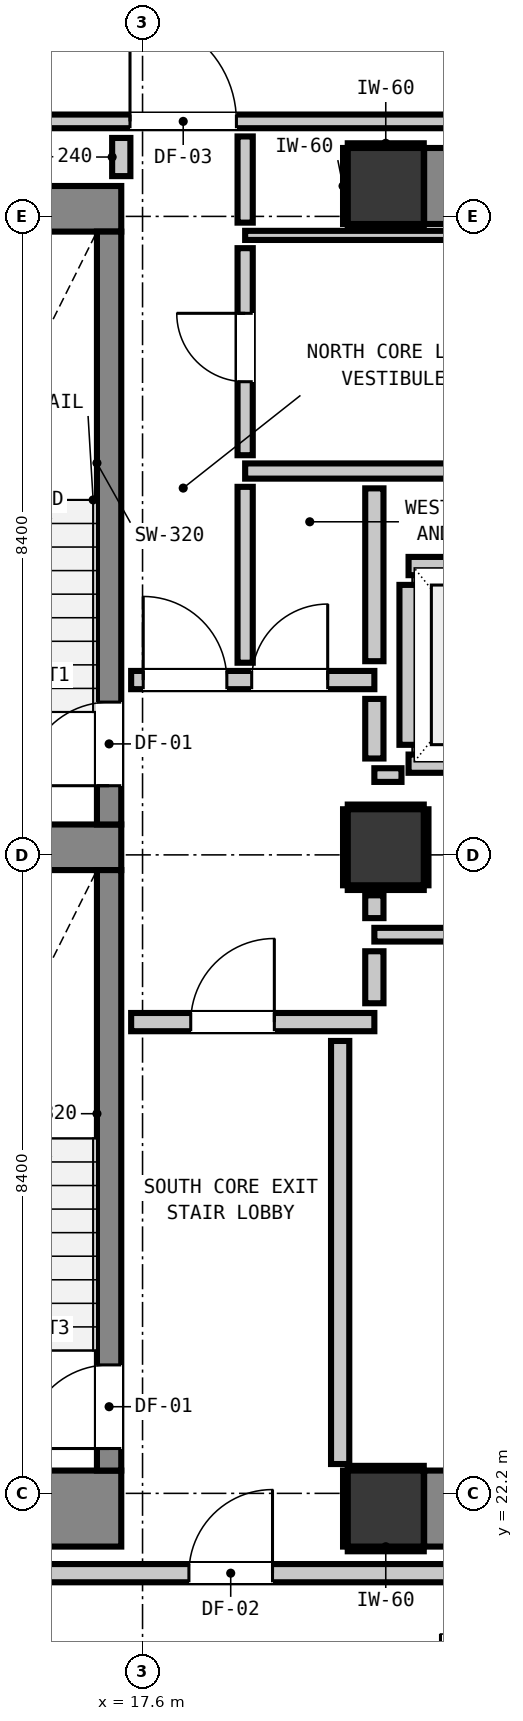
"""IFC4 building model, lengths in metres.
Left out: names, types, materials, properties, quantities, classifications, styles, units other than length and angle.
Written with IfcOpenShell. Run it as: python <this file> out.ifc"""

import sys

from ifc_helpers import new_model, si_unit, direction, frame, frame_2d, origin, origin_2d, place, context, subcontext, project, spatial, rectangle, extrude, element, fill, save


model = new_model("IFC4")
c1 = context("Model", 3, precision=1e-05, world=origin(), true_north=direction((0.0, 1.0)))
c2 = subcontext(c1, "Body", "Model", "MODEL_VIEW")
j1 = project(units=[si_unit("LENGTHUNIT", "METRE"), si_unit("PLANEANGLEUNIT", "RADIAN")], contexts=[c1])
p1 = place(None, origin())
s1 = spatial("IfcSite", under=j1, at=p1, CompositionType="ELEMENT")
p2 = place(p1, origin())
s2 = spatial("IfcBuilding", under=s1, at=p2, CompositionType="ELEMENT")
p3 = place(p2, frame((0.0, 0.0, 162.52)))
s3 = spatial("IfcBuildingStorey", under=s2, at=p3, CompositionType="ELEMENT", Elevation=162.52)
for number, where, z_axis, x_axis in (
    (1, (20.8, 22.0, 0.0), (0.0, 0.0, 1.0), (1.0, 0.0, 0.0)),
    (2, (20.8, 39.4, 0.0), (0.0, 0.0, 1.0), (1.0, 0.0, 0.0)),
):
    element("IfcColumn", number, at=place(p3, frame(where, z_axis=z_axis, x_axis=x_axis)), inside=s3, PredefinedType="COLUMN", context=c2, shape_type="SweptSolid", body=[
        extrude(rectangle(XDim=1.0, YDim=1.0, at=origin_2d()), origin(), (0.0, 0.0, 1.0), 3.32),
    ])
p4 = place(p3, frame((13.24, 22.0, 0.0), z_axis=(0.0, 0.0, 1.0), x_axis=(1.0, 0.0, 0.0)))
e3 = element("IfcWall", 3, at=p4, inside=s3, PredefinedType="SHEAR", context=c2, shape_type="SweptSolid", body=[
    extrude(rectangle(XDim=4.08, YDim=1.0, at=frame_2d((2.04, 0.0))), origin(), (0.0, 0.0, 1.0), 3.32),
])
p5 = place(p3, frame((13.24, 39.1, 0.0), z_axis=(0.0, 0.0, 1.0), x_axis=(1.0, 0.0, 0.0)))
e4 = element("IfcWall", 4, at=p5, inside=s3, PredefinedType="SHEAR", context=c2, shape_type="SweptSolid", body=[
    extrude(rectangle(XDim=4.08, YDim=0.6, at=frame_2d((2.04, 0.0))), origin(), (0.0, 0.0, 1.0), 3.32),
])
p6 = place(p3, frame((13.905, 30.7, 0.0), z_axis=(0.0, 0.0, 1.0), x_axis=(1.0, 0.0, 0.0)))
e5 = element("IfcWall", 5, at=p6, inside=s3, PredefinedType="SHEAR", context=c2, shape_type="SweptSolid", body=[
    extrude(rectangle(XDim=3.415, YDim=0.6, at=frame_2d((1.708, 0.0))), origin(), (0.0, 0.0, 1.0), 3.32),
])
for number, where, z_axis, x_axis in (
    (6, (21.305, 22.0, 0.0), (0.0, 0.0, 1.0), (1.0, 0.0, 0.0)),
    (7, (21.305, 39.4, 0.0), (0.0, 0.0, 1.0), (1.0, 0.0, 0.0)),
):
    element("IfcWall", number, at=place(p3, frame(where, z_axis=z_axis, x_axis=x_axis)), inside=s3, PredefinedType="SHEAR", context=c2, shape_type="SweptSolid", body=[
        extrude(rectangle(XDim=7.39, YDim=1.0, at=frame_2d((3.695, 0.0))), origin(), (0.0, 0.0, 1.0), 3.32),
    ])
p7 = place(p3, frame((17.16, 31.0, 0.0), z_axis=(0.0, 0.0, 1.0), x_axis=(0.0, 1.0, 0.0)))
e8 = element("IfcWall", 8, at=p7, inside=s3, PredefinedType="SHEAR", context=c2, shape_type="SweptSolid", body=[
    extrude(rectangle(XDim=7.8, YDim=0.32, at=frame_2d((3.9, 0.0))), origin(), (0.0, 0.0, 1.0), 3.32),
])
p8 = place(p7, frame((0.51, 0.0, 0.0)))
e9 = element("IfcOpeningElement", 9, at=p8, cuts=e8, PredefinedType="OPENING", context=c2, shape_type="SweptSolid", body=[
    extrude(rectangle(XDim=1.1, YDim=2.15, at=frame_2d((0.55, 1.075))), frame((0.0, 0.17, 0.0), z_axis=(0.0, -1.0, 0.0), x_axis=(1.0, 0.0, 0.0)), (0.0, 0.0, 1.0), 0.34),
])
p9 = place(p3, frame((17.16, 22.5, 0.0), z_axis=(0.0, 0.0, 1.0), x_axis=(0.0, 1.0, 0.0)))
e10 = element("IfcWall", 10, at=p9, inside=s3, PredefinedType="SHEAR", context=c2, shape_type="SweptSolid", body=[
    extrude(rectangle(XDim=7.9, YDim=0.32, at=frame_2d((3.95, 0.0))), origin(), (0.0, 0.0, 1.0), 3.32),
])
p10 = place(p9, frame((0.29, 0.0, 0.0)))
e11 = element("IfcOpeningElement", 11, at=p10, cuts=e10, PredefinedType="OPENING", context=c2, shape_type="SweptSolid", body=[
    extrude(rectangle(XDim=1.1, YDim=2.15, at=frame_2d((0.55, 1.075))), frame((0.0, 0.17, 0.0), z_axis=(0.0, -1.0, 0.0), x_axis=(1.0, 0.0, 0.0)), (0.0, 0.0, 1.0), 0.34),
])
p11 = place(p3, frame((20.8, 30.7, 0.0), z_axis=(0.0, 0.0, 1.0), x_axis=(1.0, 0.0, 0.0)))
e12 = element("IfcColumn", 12, at=p11, inside=s3, PredefinedType="COLUMN", context=c2, shape_type="SweptSolid", body=[
    extrude(rectangle(XDim=1.0, YDim=1.0, at=origin_2d()), origin(), (0.0, 0.0, 1.0), 3.32),
])
for number, where, z_axis, x_axis in (
    (13, (21.1, 31.8, 0.0), (0.0, 0.0, 1.0), (1.0, 0.0, 0.0)),
    (14, (21.1, 34.4, 0.0), (0.0, 0.0, 1.0), (1.0, 0.0, 0.0)),
):
    element("IfcWall", number, at=place(p3, frame(where, z_axis=z_axis, x_axis=x_axis)), inside=s3, PredefinedType="PARTITIONING", context=c2, shape_type="SweptSolid", body=[
        extrude(rectangle(XDim=2.2, YDim=0.24, at=frame_2d((1.1, 0.0))), origin(), (0.0, 0.0, 1.0), 2.9),
    ])
p12 = place(p3, frame((21.1, 32.048, 0.0), z_axis=(0.0, 0.0, 1.0), x_axis=(0.0, 1.0, 0.0)))
e15 = element("IfcWall", 15, at=p12, inside=s3, PredefinedType="PARTITIONING", context=c2, shape_type="SweptSolid", body=[
    extrude(rectangle(XDim=2.104, YDim=0.24, at=frame_2d((1.052, 0.0))), origin(), (0.0, 0.0, 1.0), 0.905),
])
p13 = place(p3, frame((9.407, 21.15, 0.0), z_axis=(0.0, 0.0, 1.0), x_axis=(1.0, 0.0, 0.0)))
e16 = element("IfcWall", 16, at=p13, inside=s3, PredefinedType="PARTITIONING", context=c2, shape_type="SweptSolid", body=[
    extrude(rectangle(XDim=39.386, YDim=0.24, at=frame_2d((19.693, 0.0))), origin(), (0.0, 0.0, 1.0), 2.9),
])
p14 = place(p13, frame((8.803, 0.0, 0.0)))
e17 = element("IfcOpeningElement", 17, at=p14, cuts=e16, PredefinedType="OPENING", context=c2, shape_type="SweptSolid", body=[
    extrude(rectangle(XDim=1.1, YDim=2.15, at=frame_2d((0.55, 1.075))), frame((0.0, 0.13, 0.0), z_axis=(0.0, -1.0, 0.0), x_axis=(1.0, 0.0, 0.0)), (0.0, 0.0, 1.0), 0.26),
])
p15 = place(p13, frame((1.192, 0.0, 0.0)))
e18 = element("IfcOpeningElement", 18, at=p15, cuts=e16, PredefinedType="OPENING", context=c2, shape_type="SweptSolid", body=[
    extrude(rectangle(XDim=1.4, YDim=2.15, at=frame_2d((0.7, 1.075))), frame((0.0, 0.13, 0.0), z_axis=(0.0, -1.0, 0.0), x_axis=(1.0, 0.0, 0.0)), (0.0, 0.0, 1.0), 0.26),
])
p16 = place(p13, frame((28.643, 0.0, 0.0)))
e19 = element("IfcOpeningElement", 19, at=p16, cuts=e16, PredefinedType="OPENING", context=c2, shape_type="SweptSolid", body=[
    extrude(rectangle(XDim=1.4, YDim=2.15, at=frame_2d((0.7, 1.075))), frame((0.0, 0.13, 0.0), z_axis=(0.0, -1.0, 0.0), x_axis=(1.0, 0.0, 0.0)), (0.0, 0.0, 1.0), 0.26),
])
p17 = place(p13, frame((34.394, 0.0, 0.0)))
e20 = element("IfcOpeningElement", 20, at=p17, cuts=e16, PredefinedType="OPENING", context=c2, shape_type="SweptSolid", body=[
    extrude(rectangle(XDim=0.9, YDim=2.1, at=frame_2d((0.45, 1.05))), frame((0.0, 0.13, 0.0), z_axis=(0.0, -1.0, 0.0), x_axis=(1.0, 0.0, 0.0)), (0.0, 0.0, 1.0), 0.26),
])
p18 = place(p3, frame((17.45, 28.4, 0.0), z_axis=(0.0, 0.0, 1.0), x_axis=(1.0, 0.0, 0.0)))
e21 = element("IfcWall", 21, at=p18, inside=s3, PredefinedType="PARTITIONING", context=c2, shape_type="SweptSolid", body=[
    extrude(rectangle(XDim=3.2, YDim=0.24, at=frame_2d((1.6, 0.0))), origin(), (0.0, 0.0, 1.0), 2.9),
])
p19 = place(p18, frame((0.784, 0.0, 0.0)))
e22 = element("IfcOpeningElement", 22, at=p19, cuts=e21, PredefinedType="OPENING", context=c2, shape_type="SweptSolid", body=[
    extrude(rectangle(XDim=1.1, YDim=2.15, at=frame_2d((0.55, 1.075))), frame((0.0, 0.13, 0.0), z_axis=(0.0, -1.0, 0.0), x_axis=(1.0, 0.0, 0.0)), (0.0, 0.0, 1.0), 0.26),
])
p20 = place(p3, frame((17.45, 32.9, 0.0), z_axis=(0.0, 0.0, 1.0), x_axis=(1.0, 0.0, 0.0)))
e23 = element("IfcWall", 23, at=p20, inside=s3, PredefinedType="PARTITIONING", context=c2, shape_type="SweptSolid", body=[
    extrude(rectangle(XDim=3.2, YDim=0.24, at=frame_2d((1.6, 0.0))), origin(), (0.0, 0.0, 1.0), 2.9),
])
p21 = place(p20, frame((0.159, 0.0, 0.0)))
e24 = element("IfcOpeningElement", 24, at=p21, cuts=e23, PredefinedType="OPENING", context=c2, shape_type="SweptSolid", body=[
    extrude(rectangle(XDim=1.1, YDim=2.15, at=frame_2d((0.55, 1.075))), frame((0.0, 0.13, 0.0), z_axis=(0.0, -1.0, 0.0), x_axis=(1.0, 0.0, 0.0)), (0.0, 0.0, 1.0), 0.26),
])
p22 = place(p20, frame((1.586, 0.0, 0.0)))
e25 = element("IfcOpeningElement", 25, at=p22, cuts=e23, PredefinedType="OPENING", context=c2, shape_type="SweptSolid", body=[
    extrude(rectangle(XDim=1.0, YDim=2.15, at=frame_2d((0.5, 1.075))), frame((0.0, 0.13, 0.0), z_axis=(0.0, -1.0, 0.0), x_axis=(1.0, 0.0, 0.0)), (0.0, 0.0, 1.0), 0.26),
])
p23 = place(p3, frame((18.95, 35.65, 0.0), z_axis=(0.0, 0.0, 1.0), x_axis=(1.0, 0.0, 0.0)))
e26 = element("IfcWall", 26, at=p23, inside=s3, PredefinedType="PARTITIONING", context=c2, shape_type="SweptSolid", body=[
    extrude(rectangle(XDim=11.025, YDim=0.2, at=frame_2d((5.513, 0.0))), origin(), (0.0, 0.0, 1.0), 2.9),
])
p24 = place(p3, frame((20.65, 29.55, 0.0), z_axis=(0.0, 0.0, 1.0), x_axis=(1.0, 0.0, 0.0)))
e27 = element("IfcWall", 27, at=p24, inside=s3, PredefinedType="PARTITIONING", context=c2, shape_type="SweptSolid", body=[
    extrude(rectangle(XDim=9.325, YDim=0.18, at=frame_2d((4.663, 0.0))), origin(), (0.0, 0.0, 1.0), 2.9),
])
p25 = place(p3, frame((20.65, 31.65, 0.0), z_axis=(0.0, 0.0, 1.0), x_axis=(1.0, 0.0, 0.0)))
e28 = element("IfcWall", 28, at=p25, inside=s3, PredefinedType="PARTITIONING", context=c2, shape_type="SweptSolid", body=[
    extrude(rectangle(XDim=0.357, YDim=0.18, at=frame_2d((0.179, 0.0))), origin(), (0.0, 0.0, 1.0), 2.9),
])
p26 = place(p3, frame((9.407, 40.25, 0.0), z_axis=(0.0, 0.0, 1.0), x_axis=(1.0, 0.0, 0.0)))
e29 = element("IfcWall", 29, at=p26, inside=s3, PredefinedType="PARTITIONING", context=c2, shape_type="SweptSolid", body=[
    extrude(rectangle(XDim=39.386, YDim=0.18, at=frame_2d((19.693, 0.0))), origin(), (0.0, 0.0, 1.0), 2.9),
])
p27 = place(p26, frame((8.028, 0.0, 0.0)))
e30 = element("IfcOpeningElement", 30, at=p27, cuts=e29, PredefinedType="OPENING", context=c2, shape_type="SweptSolid", body=[
    extrude(rectangle(XDim=1.4, YDim=2.15, at=frame_2d((0.7, 1.075))), frame((0.0, 0.1, 0.0), z_axis=(0.0, -1.0, 0.0), x_axis=(1.0, 0.0, 0.0)), (0.0, 0.0, 1.0), 0.2),
])
p28 = place(p26, frame((1.192, 0.0, 0.0)))
e31 = element("IfcOpeningElement", 31, at=p28, cuts=e29, PredefinedType="OPENING", context=c2, shape_type="SweptSolid", body=[
    extrude(rectangle(XDim=1.4, YDim=2.15, at=frame_2d((0.7, 1.075))), frame((0.0, 0.1, 0.0), z_axis=(0.0, -1.0, 0.0), x_axis=(1.0, 0.0, 0.0)), (0.0, 0.0, 1.0), 0.2),
])
p29 = place(p26, frame((28.643, 0.0, 0.0)))
e32 = element("IfcOpeningElement", 32, at=p29, cuts=e29, PredefinedType="OPENING", context=c2, shape_type="SweptSolid", body=[
    extrude(rectangle(XDim=1.4, YDim=2.15, at=frame_2d((0.7, 1.075))), frame((0.0, 0.1, 0.0), z_axis=(0.0, -1.0, 0.0), x_axis=(1.0, 0.0, 0.0)), (0.0, 0.0, 1.0), 0.2),
])
p30 = place(p26, frame((34.394, 0.0, 0.0)))
e33 = element("IfcOpeningElement", 33, at=p30, cuts=e29, PredefinedType="OPENING", context=c2, shape_type="SweptSolid", body=[
    extrude(rectangle(XDim=0.9, YDim=2.1, at=frame_2d((0.45, 1.05))), frame((0.0, 0.1, 0.0), z_axis=(0.0, -1.0, 0.0), x_axis=(1.0, 0.0, 0.0)), (0.0, 0.0, 1.0), 0.2),
])
p31 = place(p3, frame((18.95, 38.75, 0.0), z_axis=(0.0, 0.0, 1.0), x_axis=(1.0, 0.0, 0.0)))
e34 = element("IfcWall", 34, at=p31, inside=s3, PredefinedType="PARTITIONING", context=c2, shape_type="SweptSolid", body=[
    extrude(rectangle(XDim=13.56, YDim=0.12, at=frame_2d((6.78, 0.0))), origin(), (0.0, 0.0, 1.0), 0.905),
])
p32 = place(p3, frame((17.32, 39.53, 0.0), z_axis=(0.0, 0.0, 1.0), x_axis=(0.0, 1.0, 0.0)))
e35 = element("IfcWall", 35, at=p32, inside=s3, PredefinedType="PARTITIONING", context=c2, shape_type="SweptSolid", body=[
    extrude(rectangle(XDim=0.502, YDim=0.24, at=frame_2d((0.251, 0.0))), origin(), (0.0, 0.0, 1.0), 2.9),
])
p33 = place(p3, frame((20.2, 22.586, 0.0), z_axis=(0.0, 0.0, 1.0), x_axis=(0.0, 1.0, 0.0)))
e36 = element("IfcWall", 36, at=p33, inside=s3, PredefinedType="PARTITIONING", context=c2, shape_type="SweptSolid", body=[
    extrude(rectangle(XDim=5.566, YDim=0.24, at=frame_2d((2.783, 0.0))), origin(), (0.0, 0.0, 1.0), 0.905),
])
p34 = place(p3, frame((20.65, 28.648, 0.0), z_axis=(0.0, 0.0, 1.0), x_axis=(0.0, 1.0, 0.0)))
e37 = element("IfcWall", 37, at=p34, inside=s3, PredefinedType="PARTITIONING", context=c2, shape_type="SweptSolid", body=[
    extrude(rectangle(XDim=0.684, YDim=0.24, at=frame_2d((0.342, 0.0))), origin(), (0.0, 0.0, 1.0), 0.905),
])
p35 = place(p3, frame((20.65, 29.768, 0.0), z_axis=(0.0, 0.0, 1.0), x_axis=(0.0, 1.0, 0.0)))
e38 = element("IfcWall", 38, at=p35, inside=s3, PredefinedType="PARTITIONING", context=c2, shape_type="SweptSolid", body=[
    extrude(rectangle(XDim=0.3, YDim=0.24, at=frame_2d((0.15, 0.0))), origin(), (0.0, 0.0, 1.0), 0.905),
])
p36 = place(p3, frame((20.65, 31.868, 0.0), z_axis=(0.0, 0.0, 1.0), x_axis=(0.0, 1.0, 0.0)))
e39 = element("IfcWall", 39, at=p36, inside=s3, PredefinedType="PARTITIONING", context=c2, shape_type="SweptSolid", body=[
    extrude(rectangle(XDim=0.784, YDim=0.24, at=frame_2d((0.392, 0.0))), origin(), (0.0, 0.0, 1.0), 0.905),
])
p37 = place(p3, frame((20.65, 33.148, 0.0), z_axis=(0.0, 0.0, 1.0), x_axis=(0.0, 1.0, 0.0)))
e40 = element("IfcWall", 40, at=p37, inside=s3, PredefinedType="PARTITIONING", context=c2, shape_type="SweptSolid", body=[
    extrude(rectangle(XDim=2.274, YDim=0.24, at=frame_2d((1.137, 0.0))), origin(), (0.0, 0.0, 1.0), 0.905),
])
p38 = place(p3, frame((18.95, 33.128, 0.0), z_axis=(0.0, 0.0, 1.0), x_axis=(0.0, 1.0, 0.0)))
e41 = element("IfcWall", 41, at=p38, inside=s3, PredefinedType="PARTITIONING", context=c2, shape_type="SweptSolid", body=[
    extrude(rectangle(XDim=2.314, YDim=0.2, at=frame_2d((1.157, 0.0))), origin(), (0.0, 0.0, 1.0), 2.9),
])
p39 = place(p3, frame((18.95, 35.858, 0.0), z_axis=(0.0, 0.0, 1.0), x_axis=(0.0, 1.0, 0.0)))
e42 = element("IfcWall", 42, at=p39, inside=s3, PredefinedType="PARTITIONING", context=c2, shape_type="SweptSolid", body=[
    extrude(rectangle(XDim=2.724, YDim=0.2, at=frame_2d((1.362, 0.0))), origin(), (0.0, 0.0, 1.0), 2.9),
])
p40 = place(p39, frame((0.967, 0.0, 0.0)))
e43 = element("IfcOpeningElement", 43, at=p40, cuts=e42, PredefinedType="OPENING", context=c2, shape_type="SweptSolid", body=[
    extrude(rectangle(XDim=0.9, YDim=2.1, at=frame_2d((0.45, 1.05))), frame((0.0, 0.11, 0.0), z_axis=(0.0, -1.0, 0.0), x_axis=(1.0, 0.0, 0.0)), (0.0, 0.0, 1.0), 0.22),
])
p41 = place(p3, frame((18.95, 38.918, 0.0), z_axis=(0.0, 0.0, 1.0), x_axis=(0.0, 1.0, 0.0)))
e44 = element("IfcWall", 44, at=p41, inside=s3, PredefinedType="PARTITIONING", context=c2, shape_type="SweptSolid", body=[
    extrude(rectangle(XDim=1.134, YDim=0.2, at=frame_2d((0.567, 0.0))), origin(), (0.0, 0.0, 1.0), 2.9),
])
for number, where, z_axis, x_axis in (
    (45, (20.3, 21.468, 0.0), (0.0, 0.0, 1.0), (1.0, 0.0, 0.0)),
    (46, (20.3, 22.532, 0.0), (0.0, 0.0, 1.0), (1.0, 0.0, 0.0)),
    (47, (20.268, 21.5, 0.0), (0.0, 0.0, 1.0), (0.0, 1.0, 0.0)),
    (48, (20.3, 38.868, 0.0), (0.0, 0.0, 1.0), (1.0, 0.0, 0.0)),
    (49, (20.3, 39.932, 0.0), (0.0, 0.0, 1.0), (1.0, 0.0, 0.0)),
    (50, (20.268, 38.9, 0.0), (0.0, 0.0, 1.0), (0.0, 1.0, 0.0)),
    (51, (20.3, 30.168, 0.0), (0.0, 0.0, 1.0), (1.0, 0.0, 0.0)),
    (52, (20.3, 31.232, 0.0), (0.0, 0.0, 1.0), (1.0, 0.0, 0.0)),
    (53, (20.268, 30.2, 0.0), (0.0, 0.0, 1.0), (0.0, 1.0, 0.0)),
    (54, (21.332, 30.2, 0.0), (0.0, 0.0, 1.0), (0.0, 1.0, 0.0)),
):
    element("IfcWall", number, at=place(p3, frame(where, z_axis=z_axis, x_axis=x_axis)), inside=s3, PredefinedType="PARTITIONING", context=c2, shape_type="SweptSolid", body=[
        extrude(rectangle(XDim=1.0, YDim=0.06, at=frame_2d((0.5, 0.0))), origin(), (0.0, 0.0, 1.0), 0.905),
    ])
p42 = place(p8, origin())
e55 = element("IfcDoor", 55, at=p42, inside=s3, OperationType="SINGLE_SWING_LEFT", PredefinedType="DOOR", context=c2, shape_type="SweptSolid", body=[
    extrude(rectangle(XDim=1.1, YDim=2.15, at=frame_2d((0.55, 1.075))), frame((0.0, 0.025, 0.0), z_axis=(0.0, -1.0, 0.0), x_axis=(1.0, 0.0, 0.0)), (0.0, 0.0, 1.0), 0.05),
])
fill(e9, e55)
p43 = place(p10, origin())
e56 = element("IfcDoor", 56, at=p43, inside=s3, OperationType="SINGLE_SWING_LEFT", PredefinedType="DOOR", context=c2, shape_type="SweptSolid", body=[
    extrude(rectangle(XDim=1.1, YDim=2.15, at=frame_2d((0.55, 1.075))), frame((0.0, 0.025, 0.0), z_axis=(0.0, -1.0, 0.0), x_axis=(1.0, 0.0, 0.0)), (0.0, 0.0, 1.0), 0.05),
])
fill(e11, e56)
p44 = place(p19, origin())
e57 = element("IfcDoor", 57, at=p44, inside=s3, OperationType="SINGLE_SWING_RIGHT", PredefinedType="DOOR", context=c2, shape_type="SweptSolid", body=[
    extrude(rectangle(XDim=1.1, YDim=2.15, at=frame_2d((0.55, 1.075))), frame((0.0, 0.025, 0.0), z_axis=(0.0, -1.0, 0.0), x_axis=(1.0, 0.0, 0.0)), (0.0, 0.0, 1.0), 0.05),
])
fill(e22, e57)
p45 = place(p21, origin())
e58 = element("IfcDoor", 58, at=p45, inside=s3, OperationType="SINGLE_SWING_LEFT", PredefinedType="DOOR", context=c2, shape_type="SweptSolid", body=[
    extrude(rectangle(XDim=1.1, YDim=2.15, at=frame_2d((0.55, 1.075))), frame((0.0, 0.025, 0.0), z_axis=(0.0, -1.0, 0.0), x_axis=(1.0, 0.0, 0.0)), (0.0, 0.0, 1.0), 0.05),
])
fill(e24, e58)
p46 = place(p14, origin())
e59 = element("IfcDoor", 59, at=p46, inside=s3, OperationType="SINGLE_SWING_RIGHT", PredefinedType="DOOR", context=c2, shape_type="SweptSolid", body=[
    extrude(rectangle(XDim=1.1, YDim=2.15, at=frame_2d((0.55, 1.075))), frame((0.0, 0.025, 0.0), z_axis=(0.0, -1.0, 0.0), x_axis=(1.0, 0.0, 0.0)), (0.0, 0.0, 1.0), 0.05),
])
fill(e17, e59)
p47 = place(p27, origin())
e60 = element("IfcDoor", 60, at=p47, inside=s3, OperationType="SINGLE_SWING_LEFT", PredefinedType="DOOR", context=c2, shape_type="SweptSolid", body=[
    extrude(rectangle(XDim=1.4, YDim=2.15, at=frame_2d((0.7, 1.075))), frame((0.0, 0.025, 0.0), z_axis=(0.0, -1.0, 0.0), x_axis=(1.0, 0.0, 0.0)), (0.0, 0.0, 1.0), 0.05),
])
fill(e30, e60)
p48 = place(p22, origin())
e61 = element("IfcDoor", 61, at=p48, inside=s3, OperationType="SINGLE_SWING_RIGHT", PredefinedType="DOOR", context=c2, shape_type="SweptSolid", body=[
    extrude(rectangle(XDim=1.0, YDim=2.15, at=frame_2d((0.5, 1.075))), frame((0.0, 0.025, 0.0), z_axis=(0.0, -1.0, 0.0), x_axis=(1.0, 0.0, 0.0)), (0.0, 0.0, 1.0), 0.05),
])
fill(e25, e61)
p49 = place(p40, origin())
e62 = element("IfcDoor", 62, at=p49, inside=s3, OperationType="SINGLE_SWING_RIGHT", PredefinedType="DOOR", context=c2, shape_type="SweptSolid", body=[
    extrude(rectangle(XDim=0.9, YDim=2.1, at=frame_2d((0.45, 1.05))), frame((0.0, 0.025, 0.0), z_axis=(0.0, -1.0, 0.0), x_axis=(1.0, 0.0, 0.0)), (0.0, 0.0, 1.0), 0.05),
])
fill(e43, e62)
save(model, sys.argv[1])
